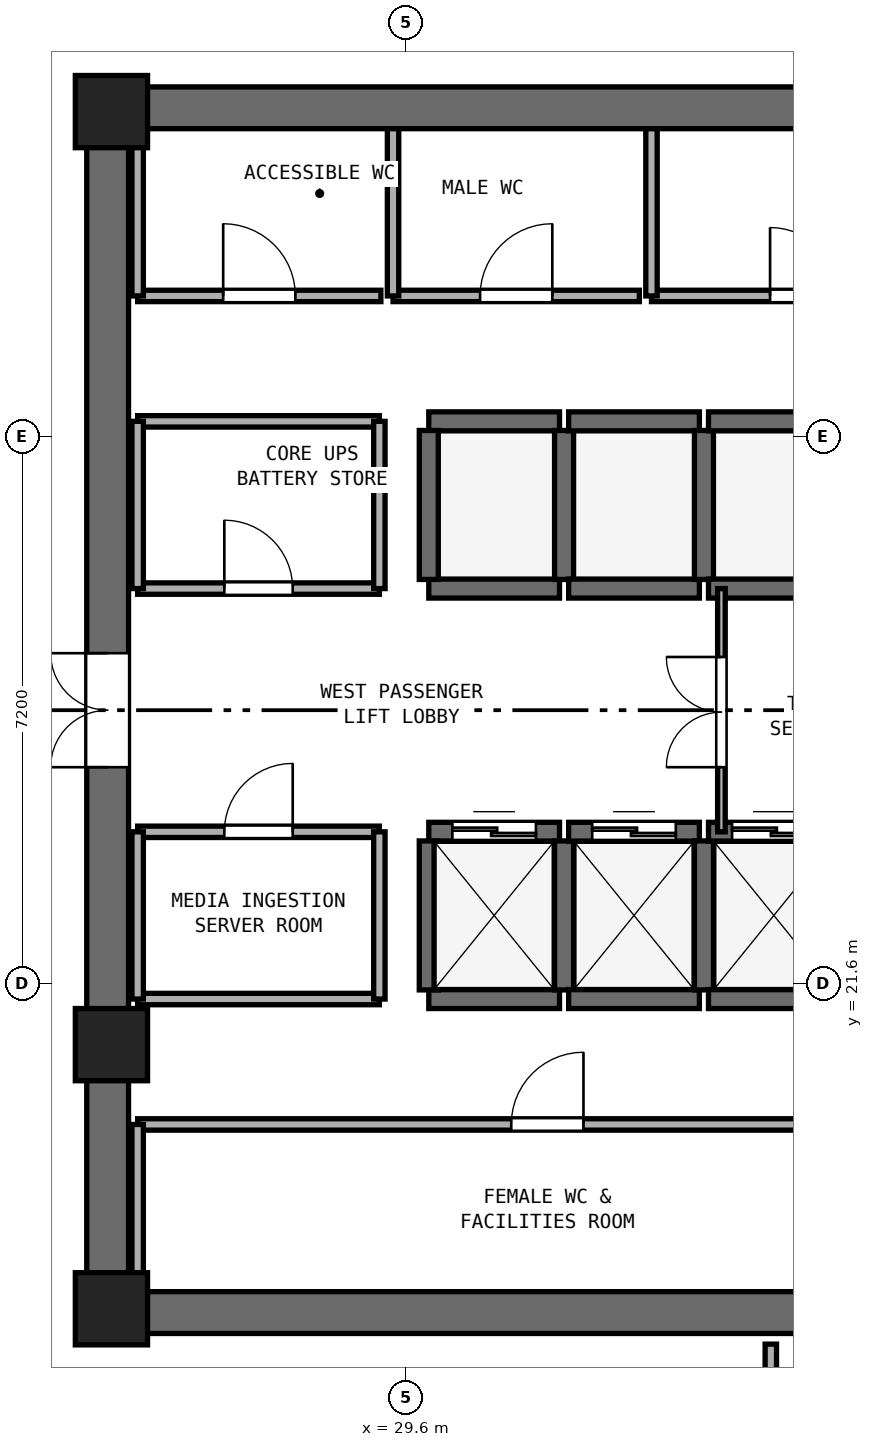
"""IFC4 building model, lengths in metres.
Left out: names, types, materials, properties, quantities, classifications, styles, units other than length and angle.
Written with IfcOpenShell. Run it as: python <this file> out.ifc"""

import sys

from ifc_helpers import new_model, si_unit, direction, frame, frame_2d, origin, origin_2d, place, context, subcontext, project, spatial, rectangle, extrude, element, fill, save


model = new_model("IFC4")
c1 = context("Model", 3, precision=1e-05, world=origin(), true_north=direction((0.0, 1.0)))
c2 = subcontext(c1, "Body", "Model", "MODEL_VIEW")
j1 = project(units=[si_unit("LENGTHUNIT", "METRE"), si_unit("PLANEANGLEUNIT", "RADIAN")], contexts=[c1])
p1 = place(None, origin())
s1 = spatial("IfcSite", under=j1, at=p1, CompositionType="ELEMENT")
p2 = place(p1, origin())
s2 = spatial("IfcBuilding", under=s1, at=p2, CompositionType="ELEMENT")
p3 = place(p2, frame((0.0, 0.0, 185.8)))
s3 = spatial("IfcBuildingStorey", under=s2, at=p3, CompositionType="ELEMENT", Elevation=185.8)
for number, where, z_axis, x_axis in (
    (1, (25.4, 17.275, 0.0), (0.0, 0.0, 1.0), (1.0, 0.0, 0.0)),
    (2, (25.4, 33.125, 0.0), (0.0, 0.0, 1.0), (1.0, 0.0, 0.0)),
):
    element("IfcWall", number, at=place(p3, frame(where, z_axis=z_axis, x_axis=x_axis)), inside=s3, PredefinedType="SHEAR", context=c2, shape_type="SweptSolid", body=[
        extrude(rectangle(XDim=23.2, YDim=0.55, at=frame_2d((11.6, 0.0))), origin(), (0.0, 0.0, 1.0), 3.54),
    ])
p4 = place(p3, frame((25.675, 17.55, 0.0), z_axis=(0.0, 0.0, 1.0), x_axis=(0.0, 1.0, 0.0)))
e3 = element("IfcWall", 3, at=p4, inside=s3, PredefinedType="SHEAR", context=c2, shape_type="SweptSolid", body=[
    extrude(rectangle(XDim=15.3, YDim=0.55, at=frame_2d((7.65, 0.0))), origin(), (0.0, 0.0, 1.0), 3.54),
])
p5 = place(p4, frame((6.9, 0.0, 0.0)))
e4 = element("IfcOpeningElement", 4, at=p5, cuts=e3, PredefinedType="OPENING", context=c2, shape_type="SweptSolid", body=[
    extrude(rectangle(XDim=1.5, YDim=2.15, at=frame_2d((0.75, 1.075))), frame((0.0, 0.285, 0.0), z_axis=(0.0, -1.0, 0.0), x_axis=(1.0, 0.0, 0.0)), (0.0, 0.0, 1.0), 0.57),
])
for number, where, z_axis, x_axis in (
    (5, (25.725, 17.325, 0.0), (0.0, 0.0, 1.0), (1.0, 0.0, 0.0)),
    (6, (25.725, 33.075, 0.0), (0.0, 0.0, 1.0), (1.0, 0.0, 0.0)),
    (7, (25.725, 20.8, 0.0), (0.0, 0.0, 1.0), (1.0, 0.0, 0.0)),
):
    element("IfcColumn", number, at=place(p3, frame(where, z_axis=z_axis, x_axis=x_axis)), inside=s3, PredefinedType="PILASTER", context=c2, shape_type="SweptSolid", body=[
        extrude(rectangle(XDim=0.95, YDim=0.95, at=origin_2d()), origin(), (0.0, 0.0, 1.0), 3.8),
    ])
p6 = place(p3, frame((29.9, 21.4, 0.0), z_axis=(0.0, 0.0, 1.0), x_axis=(1.0, 0.0, 0.0)))
e8 = element("IfcWall", 8, at=p6, inside=s3, PredefinedType="SHEAR", context=c2, shape_type="SweptSolid", body=[
    extrude(rectangle(XDim=1.72, YDim=0.25, at=frame_2d((0.86, 0.0))), origin(), (0.0, 0.0, 1.0), 3.54),
])
p7 = place(p3, frame((29.9, 23.6, 0.0), z_axis=(0.0, 0.0, 1.0), x_axis=(1.0, 0.0, 0.0)))
e9 = element("IfcWall", 9, at=p7, inside=s3, PredefinedType="SHEAR", context=c2, shape_type="SweptSolid", body=[
    extrude(rectangle(XDim=1.72, YDim=0.25, at=frame_2d((0.86, 0.0))), origin(), (0.0, 0.0, 1.0), 3.54),
])
p8 = place(p7, frame((0.31, 0.0, 0.0)))
e10 = element("IfcOpeningElement", 10, at=p8, cuts=e9, PredefinedType="OPENING", context=c2, shape_type="SweptSolid", body=[
    extrude(rectangle(XDim=1.1, YDim=2.15, at=frame_2d((0.55, 1.075))), frame((0.0, 0.135, 0.0), z_axis=(0.0, -1.0, 0.0), x_axis=(1.0, 0.0, 0.0)), (0.0, 0.0, 1.0), 0.27),
])
for number, where, z_axis, x_axis in (
    (11, (29.9, 21.52, 0.0), (0.0, 0.0, 1.0), (0.0, 1.0, 0.0)),
    (12, (31.68, 21.52, 0.0), (0.0, 0.0, 1.0), (0.0, 1.0, 0.0)),
):
    element("IfcWall", number, at=place(p3, frame(where, z_axis=z_axis, x_axis=x_axis)), inside=s3, PredefinedType="SHEAR", context=c2, shape_type="SweptSolid", body=[
        extrude(rectangle(XDim=1.96, YDim=0.25, at=frame_2d((0.98, 0.0))), origin(), (0.0, 0.0, 1.0), 3.54),
    ])
p9 = place(p3, frame((31.74, 21.4, 0.0), z_axis=(0.0, 0.0, 1.0), x_axis=(1.0, 0.0, 0.0)))
e13 = element("IfcWall", 13, at=p9, inside=s3, PredefinedType="SHEAR", context=c2, shape_type="SweptSolid", body=[
    extrude(rectangle(XDim=1.72, YDim=0.25, at=frame_2d((0.86, 0.0))), origin(), (0.0, 0.0, 1.0), 3.54),
])
p10 = place(p3, frame((31.74, 23.6, 0.0), z_axis=(0.0, 0.0, 1.0), x_axis=(1.0, 0.0, 0.0)))
e14 = element("IfcWall", 14, at=p10, inside=s3, PredefinedType="SHEAR", context=c2, shape_type="SweptSolid", body=[
    extrude(rectangle(XDim=1.72, YDim=0.25, at=frame_2d((0.86, 0.0))), origin(), (0.0, 0.0, 1.0), 3.54),
])
p11 = place(p10, frame((0.31, 0.0, 0.0)))
e15 = element("IfcOpeningElement", 15, at=p11, cuts=e14, PredefinedType="OPENING", context=c2, shape_type="SweptSolid", body=[
    extrude(rectangle(XDim=1.1, YDim=2.15, at=frame_2d((0.55, 1.075))), frame((0.0, 0.135, 0.0), z_axis=(0.0, -1.0, 0.0), x_axis=(1.0, 0.0, 0.0)), (0.0, 0.0, 1.0), 0.27),
])
p12 = place(p3, frame((33.52, 21.52, 0.0), z_axis=(0.0, 0.0, 1.0), x_axis=(0.0, 1.0, 0.0)))
e16 = element("IfcWall", 16, at=p12, inside=s3, PredefinedType="SHEAR", context=c2, shape_type="SweptSolid", body=[
    extrude(rectangle(XDim=1.96, YDim=0.25, at=frame_2d((0.98, 0.0))), origin(), (0.0, 0.0, 1.0), 3.54),
])
p13 = place(p3, frame((33.58, 21.4, 0.0), z_axis=(0.0, 0.0, 1.0), x_axis=(1.0, 0.0, 0.0)))
e17 = element("IfcWall", 17, at=p13, inside=s3, PredefinedType="SHEAR", context=c2, shape_type="SweptSolid", body=[
    extrude(rectangle(XDim=1.72, YDim=0.25, at=frame_2d((0.86, 0.0))), origin(), (0.0, 0.0, 1.0), 3.54),
])
p14 = place(p3, frame((33.58, 23.6, 0.0), z_axis=(0.0, 0.0, 1.0), x_axis=(1.0, 0.0, 0.0)))
e18 = element("IfcWall", 18, at=p14, inside=s3, PredefinedType="SHEAR", context=c2, shape_type="SweptSolid", body=[
    extrude(rectangle(XDim=1.72, YDim=0.25, at=frame_2d((0.86, 0.0))), origin(), (0.0, 0.0, 1.0), 3.54),
])
p15 = place(p14, frame((0.31, 0.0, 0.0)))
e19 = element("IfcOpeningElement", 19, at=p15, cuts=e18, PredefinedType="OPENING", context=c2, shape_type="SweptSolid", body=[
    extrude(rectangle(XDim=1.1, YDim=2.15, at=frame_2d((0.55, 1.075))), frame((0.0, 0.135, 0.0), z_axis=(0.0, -1.0, 0.0), x_axis=(1.0, 0.0, 0.0)), (0.0, 0.0, 1.0), 0.27),
])
for number, where, z_axis, x_axis in (
    (20, (29.9, 26.8, 0.0), (0.0, 0.0, 1.0), (1.0, 0.0, 0.0)),
    (21, (29.9, 29.0, 0.0), (0.0, 0.0, 1.0), (1.0, 0.0, 0.0)),
):
    element("IfcWall", number, at=place(p3, frame(where, z_axis=z_axis, x_axis=x_axis)), inside=s3, PredefinedType="SHEAR", context=c2, shape_type="SweptSolid", body=[
        extrude(rectangle(XDim=1.72, YDim=0.25, at=frame_2d((0.86, 0.0))), origin(), (0.0, 0.0, 1.0), 3.54),
    ])
for number, where, z_axis, x_axis in (
    (22, (29.9, 26.92, 0.0), (0.0, 0.0, 1.0), (0.0, 1.0, 0.0)),
    (23, (31.68, 26.92, 0.0), (0.0, 0.0, 1.0), (0.0, 1.0, 0.0)),
):
    element("IfcWall", number, at=place(p3, frame(where, z_axis=z_axis, x_axis=x_axis)), inside=s3, PredefinedType="SHEAR", context=c2, shape_type="SweptSolid", body=[
        extrude(rectangle(XDim=1.96, YDim=0.25, at=frame_2d((0.98, 0.0))), origin(), (0.0, 0.0, 1.0), 3.54),
    ])
for number, where, z_axis, x_axis in (
    (24, (31.74, 26.8, 0.0), (0.0, 0.0, 1.0), (1.0, 0.0, 0.0)),
    (25, (31.74, 29.0, 0.0), (0.0, 0.0, 1.0), (1.0, 0.0, 0.0)),
):
    element("IfcWall", number, at=place(p3, frame(where, z_axis=z_axis, x_axis=x_axis)), inside=s3, PredefinedType="SHEAR", context=c2, shape_type="SweptSolid", body=[
        extrude(rectangle(XDim=1.72, YDim=0.25, at=frame_2d((0.86, 0.0))), origin(), (0.0, 0.0, 1.0), 3.54),
    ])
p16 = place(p3, frame((33.52, 26.92, 0.0), z_axis=(0.0, 0.0, 1.0), x_axis=(0.0, 1.0, 0.0)))
e26 = element("IfcWall", 26, at=p16, inside=s3, PredefinedType="SHEAR", context=c2, shape_type="SweptSolid", body=[
    extrude(rectangle(XDim=1.96, YDim=0.25, at=frame_2d((0.98, 0.0))), origin(), (0.0, 0.0, 1.0), 3.54),
])
for number, where, z_axis, x_axis in (
    (27, (33.58, 26.8, 0.0), (0.0, 0.0, 1.0), (1.0, 0.0, 0.0)),
    (28, (33.58, 29.0, 0.0), (0.0, 0.0, 1.0), (1.0, 0.0, 0.0)),
):
    element("IfcWall", number, at=place(p3, frame(where, z_axis=z_axis, x_axis=x_axis)), inside=s3, PredefinedType="SHEAR", context=c2, shape_type="SweptSolid", body=[
        extrude(rectangle(XDim=1.72, YDim=0.25, at=frame_2d((0.86, 0.0))), origin(), (0.0, 0.0, 1.0), 3.54),
    ])
p17 = place(p3, frame((26.07, 30.65, 0.0), z_axis=(0.0, 0.0, 1.0), x_axis=(1.0, 0.0, 0.0)))
e29 = element("IfcWall", 29, at=p17, inside=s3, PredefinedType="PARTITIONING", context=c2, shape_type="SweptSolid", body=[
    extrude(rectangle(XDim=3.2, YDim=0.15, at=frame_2d((1.6, 0.0))), origin(), (0.0, 0.0, 1.0), 3.54),
])
p18 = place(p17, frame((1.125, 0.0, 0.0)))
e30 = element("IfcOpeningElement", 30, at=p18, cuts=e29, PredefinedType="OPENING", context=c2, shape_type="SweptSolid", body=[
    extrude(rectangle(XDim=0.95, YDim=2.1, at=frame_2d((0.475, 1.05))), frame((0.0, 0.085, 0.0), z_axis=(0.0, -1.0, 0.0), x_axis=(1.0, 0.0, 0.0)), (0.0, 0.0, 1.0), 0.17),
])
p19 = place(p3, frame((26.07, 30.65, 0.0), z_axis=(0.0, 0.0, 1.0), x_axis=(0.0, 1.0, 0.0)))
e31 = element("IfcWall", 31, at=p19, inside=s3, PredefinedType="PARTITIONING", context=c2, shape_type="SweptSolid", body=[
    extrude(rectangle(XDim=2.2, YDim=0.15, at=frame_2d((1.1, 0.0))), origin(), (0.0, 0.0, 1.0), 2.64),
])
p20 = place(p3, frame((29.43, 30.65, 0.0), z_axis=(0.0, 0.0, 1.0), x_axis=(1.0, 0.0, 0.0)))
e32 = element("IfcWall", 32, at=p20, inside=s3, PredefinedType="PARTITIONING", context=c2, shape_type="SweptSolid", body=[
    extrude(rectangle(XDim=3.24, YDim=0.15, at=frame_2d((1.62, 0.0))), origin(), (0.0, 0.0, 1.0), 3.54),
])
p21 = place(p20, frame((1.145, 0.0, 0.0)))
e33 = element("IfcOpeningElement", 33, at=p21, cuts=e32, PredefinedType="OPENING", context=c2, shape_type="SweptSolid", body=[
    extrude(rectangle(XDim=0.95, YDim=2.1, at=frame_2d((0.475, 1.05))), frame((0.0, 0.085, 0.0), z_axis=(0.0, -1.0, 0.0), x_axis=(1.0, 0.0, 0.0)), (0.0, 0.0, 1.0), 0.17),
])
p22 = place(p3, frame((29.43, 30.65, 0.0), z_axis=(0.0, 0.0, 1.0), x_axis=(0.0, 1.0, 0.0)))
e34 = element("IfcWall", 34, at=p22, inside=s3, PredefinedType="PARTITIONING", context=c2, shape_type="SweptSolid", body=[
    extrude(rectangle(XDim=2.2, YDim=0.15, at=frame_2d((1.1, 0.0))), origin(), (0.0, 0.0, 1.0), 3.54),
])
p23 = place(p3, frame((32.83, 30.65, 0.0), z_axis=(0.0, 0.0, 1.0), x_axis=(1.0, 0.0, 0.0)))
e35 = element("IfcWall", 35, at=p23, inside=s3, PredefinedType="PARTITIONING", context=c2, shape_type="SweptSolid", body=[
    extrude(rectangle(XDim=4.02, YDim=0.15, at=frame_2d((2.01, 0.0))), origin(), (0.0, 0.0, 1.0), 3.54),
])
p24 = place(p23, frame((1.56, 0.0, 0.0)))
e36 = element("IfcOpeningElement", 36, at=p24, cuts=e35, PredefinedType="OPENING", context=c2, shape_type="SweptSolid", body=[
    extrude(rectangle(XDim=0.9, YDim=2.1, at=frame_2d((0.45, 1.05))), frame((0.0, 0.085, 0.0), z_axis=(0.0, -1.0, 0.0), x_axis=(1.0, 0.0, 0.0)), (0.0, 0.0, 1.0), 0.17),
])
p25 = place(p3, frame((32.83, 30.65, 0.0), z_axis=(0.0, 0.0, 1.0), x_axis=(0.0, 1.0, 0.0)))
e37 = element("IfcWall", 37, at=p25, inside=s3, PredefinedType="PARTITIONING", context=c2, shape_type="SweptSolid", body=[
    extrude(rectangle(XDim=2.2, YDim=0.15, at=frame_2d((1.1, 0.0))), origin(), (0.0, 0.0, 1.0), 3.54),
])
p26 = place(p3, frame((26.07, 19.75, 0.0), z_axis=(0.0, 0.0, 1.0), x_axis=(1.0, 0.0, 0.0)))
e38 = element("IfcWall", 38, at=p26, inside=s3, PredefinedType="PARTITIONING", context=c2, shape_type="SweptSolid", body=[
    extrude(rectangle(XDim=10.78, YDim=0.15, at=frame_2d((5.39, 0.0))), origin(), (0.0, 0.0, 1.0), 3.54),
])
p27 = place(p26, frame((4.915, 0.0, 0.0)))
e39 = element("IfcOpeningElement", 39, at=p27, cuts=e38, PredefinedType="OPENING", context=c2, shape_type="SweptSolid", body=[
    extrude(rectangle(XDim=0.95, YDim=2.1, at=frame_2d((0.475, 1.05))), frame((0.0, 0.085, 0.0), z_axis=(0.0, -1.0, 0.0), x_axis=(1.0, 0.0, 0.0)), (0.0, 0.0, 1.0), 0.17),
])
p28 = place(p3, frame((26.07, 17.55, 0.0), z_axis=(0.0, 0.0, 1.0), x_axis=(0.0, 1.0, 0.0)))
e40 = element("IfcWall", 40, at=p28, inside=s3, PredefinedType="PARTITIONING", context=c2, shape_type="SweptSolid", body=[
    extrude(rectangle(XDim=2.2, YDim=0.15, at=frame_2d((1.1, 0.0))), origin(), (0.0, 0.0, 1.0), 2.64),
])
p29 = place(p3, frame((26.07, 26.8, 0.0), z_axis=(0.0, 0.0, 1.0), x_axis=(1.0, 0.0, 0.0)))
e41 = element("IfcWall", 41, at=p29, inside=s3, PredefinedType="PARTITIONING", context=c2, shape_type="SweptSolid", body=[
    extrude(rectangle(XDim=3.18, YDim=0.15, at=frame_2d((1.59, 0.0))), origin(), (0.0, 0.0, 1.0), 3.54),
])
p30 = place(p29, frame((1.14, 0.0, 0.0)))
e42 = element("IfcOpeningElement", 42, at=p30, cuts=e41, PredefinedType="OPENING", context=c2, shape_type="SweptSolid", body=[
    extrude(rectangle(XDim=0.9, YDim=2.1, at=frame_2d((0.45, 1.05))), frame((0.0, 0.085, 0.0), z_axis=(0.0, -1.0, 0.0), x_axis=(1.0, 0.0, 0.0)), (0.0, 0.0, 1.0), 0.17),
])
p31 = place(p3, frame((26.07, 29.0, 0.0), z_axis=(0.0, 0.0, 1.0), x_axis=(1.0, 0.0, 0.0)))
e43 = element("IfcWall", 43, at=p31, inside=s3, PredefinedType="PARTITIONING", context=c2, shape_type="SweptSolid", body=[
    extrude(rectangle(XDim=3.18, YDim=0.15, at=frame_2d((1.59, 0.0))), origin(), (0.0, 0.0, 1.0), 3.54),
])
p32 = place(p3, frame((26.07, 26.8, 0.0), z_axis=(0.0, 0.0, 1.0), x_axis=(0.0, 1.0, 0.0)))
e44 = element("IfcWall", 44, at=p32, inside=s3, PredefinedType="PARTITIONING", context=c2, shape_type="SweptSolid", body=[
    extrude(rectangle(XDim=2.2, YDim=0.15, at=frame_2d((1.1, 0.0))), origin(), (0.0, 0.0, 1.0), 2.64),
])
p33 = place(p3, frame((29.25, 26.8, 0.0), z_axis=(0.0, 0.0, 1.0), x_axis=(0.0, 1.0, 0.0)))
e45 = element("IfcWall", 45, at=p33, inside=s3, PredefinedType="PARTITIONING", context=c2, shape_type="SweptSolid", body=[
    extrude(rectangle(XDim=2.2, YDim=0.15, at=frame_2d((1.1, 0.0))), origin(), (0.0, 0.0, 1.0), 3.54),
])
p34 = place(p3, frame((26.07, 21.4, 0.0), z_axis=(0.0, 0.0, 1.0), x_axis=(1.0, 0.0, 0.0)))
e46 = element("IfcWall", 46, at=p34, inside=s3, PredefinedType="PARTITIONING", context=c2, shape_type="SweptSolid", body=[
    extrude(rectangle(XDim=3.18, YDim=0.15, at=frame_2d((1.59, 0.0))), origin(), (0.0, 0.0, 1.0), 3.54),
])
p35 = place(p3, frame((26.07, 23.6, 0.0), z_axis=(0.0, 0.0, 1.0), x_axis=(1.0, 0.0, 0.0)))
e47 = element("IfcWall", 47, at=p35, inside=s3, PredefinedType="PARTITIONING", context=c2, shape_type="SweptSolid", body=[
    extrude(rectangle(XDim=3.18, YDim=0.15, at=frame_2d((1.59, 0.0))), origin(), (0.0, 0.0, 1.0), 3.54),
])
p36 = place(p35, frame((1.14, 0.0, 0.0)))
e48 = element("IfcOpeningElement", 48, at=p36, cuts=e47, PredefinedType="OPENING", context=c2, shape_type="SweptSolid", body=[
    extrude(rectangle(XDim=0.9, YDim=2.1, at=frame_2d((0.45, 1.05))), frame((0.0, 0.085, 0.0), z_axis=(0.0, -1.0, 0.0), x_axis=(1.0, 0.0, 0.0)), (0.0, 0.0, 1.0), 0.17),
])
p37 = place(p3, frame((26.07, 21.4, 0.0), z_axis=(0.0, 0.0, 1.0), x_axis=(0.0, 1.0, 0.0)))
e49 = element("IfcWall", 49, at=p37, inside=s3, PredefinedType="PARTITIONING", context=c2, shape_type="SweptSolid", body=[
    extrude(rectangle(XDim=2.2, YDim=0.15, at=frame_2d((1.1, 0.0))), origin(), (0.0, 0.0, 1.0), 2.64),
])
p38 = place(p3, frame((29.25, 21.4, 0.0), z_axis=(0.0, 0.0, 1.0), x_axis=(0.0, 1.0, 0.0)))
e50 = element("IfcWall", 50, at=p38, inside=s3, PredefinedType="PARTITIONING", context=c2, shape_type="SweptSolid", body=[
    extrude(rectangle(XDim=2.2, YDim=0.15, at=frame_2d((1.1, 0.0))), origin(), (0.0, 0.0, 1.0), 3.54),
])
p39 = place(p3, frame((33.75, 23.6, 0.0), z_axis=(0.0, 0.0, 1.0), x_axis=(0.0, 1.0, 0.0)))
e51 = element("IfcWall", 51, at=p39, inside=s3, PredefinedType="PARTITIONING", context=c2, shape_type="SweptSolid", body=[
    extrude(rectangle(XDim=3.2, YDim=0.1, at=frame_2d((1.6, 0.0))), origin(), (0.0, 0.0, 1.0), 3.54),
])
p40 = place(p39, frame((0.85, 0.0, 0.0)))
e52 = element("IfcOpeningElement", 52, at=p40, cuts=e51, PredefinedType="OPENING", context=c2, shape_type="SweptSolid", body=[
    extrude(rectangle(XDim=1.45, YDim=2.12, at=frame_2d((0.725, 1.06))), frame((0.0, 0.06, 0.0), z_axis=(0.0, -1.0, 0.0), x_axis=(1.0, 0.0, 0.0)), (0.0, 0.0, 1.0), 0.12),
])
p41 = place(p3, frame((34.4, 14.85, 0.0), z_axis=(0.0, 0.0, 1.0), x_axis=(0.0, 1.0, 0.0)))
e53 = element("IfcWall", 53, at=p41, inside=s3, PredefinedType="PARTITIONING", context=c2, shape_type="SweptSolid", body=[
    extrude(rectangle(XDim=2.01, YDim=0.15, at=frame_2d((1.005, 0.0))), origin(), (0.0, 0.0, 1.0), 3.54),
])
p42 = place(p8, origin())
e54 = element("IfcDoor", 54, at=p42, inside=s3, OperationType="DOUBLE_DOOR_SLIDING", PredefinedType="DOOR", context=c2, shape_type="SweptSolid", body=[
    extrude(rectangle(XDim=1.1, YDim=2.15, at=frame_2d((0.55, 1.075))), frame((0.0, 0.025, 0.0), z_axis=(0.0, -1.0, 0.0), x_axis=(1.0, 0.0, 0.0)), (0.0, 0.0, 1.0), 0.05),
])
fill(e10, e54)
p43 = place(p11, origin())
e55 = element("IfcDoor", 55, at=p43, inside=s3, OperationType="DOUBLE_DOOR_SLIDING", PredefinedType="DOOR", context=c2, shape_type="SweptSolid", body=[
    extrude(rectangle(XDim=1.1, YDim=2.15, at=frame_2d((0.55, 1.075))), frame((0.0, 0.025, 0.0), z_axis=(0.0, -1.0, 0.0), x_axis=(1.0, 0.0, 0.0)), (0.0, 0.0, 1.0), 0.05),
])
fill(e15, e55)
p44 = place(p15, origin())
e56 = element("IfcDoor", 56, at=p44, inside=s3, OperationType="DOUBLE_DOOR_SLIDING", PredefinedType="DOOR", context=c2, shape_type="SweptSolid", body=[
    extrude(rectangle(XDim=1.1, YDim=2.15, at=frame_2d((0.55, 1.075))), frame((0.0, 0.025, 0.0), z_axis=(0.0, -1.0, 0.0), x_axis=(1.0, 0.0, 0.0)), (0.0, 0.0, 1.0), 0.05),
])
fill(e19, e56)
p45 = place(p5, origin())
e57 = element("IfcDoor", 57, at=p45, inside=s3, OperationType="DOUBLE_DOOR_SINGLE_SWING", PredefinedType="DOOR", context=c2, shape_type="SweptSolid", body=[
    extrude(rectangle(XDim=1.5, YDim=2.15, at=frame_2d((0.75, 1.075))), frame((0.0, 0.025, 0.0), z_axis=(0.0, -1.0, 0.0), x_axis=(1.0, 0.0, 0.0)), (0.0, 0.0, 1.0), 0.05),
])
fill(e4, e57)
p46 = place(p18, origin())
e58 = element("IfcDoor", 58, at=p46, inside=s3, OperationType="SINGLE_SWING_LEFT", PredefinedType="DOOR", context=c2, shape_type="SweptSolid", body=[
    extrude(rectangle(XDim=0.95, YDim=2.1, at=frame_2d((0.475, 1.05))), frame((0.0, 0.025, 0.0), z_axis=(0.0, -1.0, 0.0), x_axis=(1.0, 0.0, 0.0)), (0.0, 0.0, 1.0), 0.05),
])
fill(e30, e58)
p47 = place(p21, origin())
e59 = element("IfcDoor", 59, at=p47, inside=s3, OperationType="SINGLE_SWING_RIGHT", PredefinedType="DOOR", context=c2, shape_type="SweptSolid", body=[
    extrude(rectangle(XDim=0.95, YDim=2.1, at=frame_2d((0.475, 1.05))), frame((0.0, 0.025, 0.0), z_axis=(0.0, -1.0, 0.0), x_axis=(1.0, 0.0, 0.0)), (0.0, 0.0, 1.0), 0.05),
])
fill(e33, e59)
p48 = place(p24, origin())
e60 = element("IfcDoor", 60, at=p48, inside=s3, OperationType="SINGLE_SWING_LEFT", PredefinedType="DOOR", context=c2, shape_type="SweptSolid", body=[
    extrude(rectangle(XDim=0.9, YDim=2.1, at=frame_2d((0.45, 1.05))), frame((0.0, 0.025, 0.0), z_axis=(0.0, -1.0, 0.0), x_axis=(1.0, 0.0, 0.0)), (0.0, 0.0, 1.0), 0.05),
])
fill(e36, e60)
p49 = place(p27, origin())
e61 = element("IfcDoor", 61, at=p49, inside=s3, OperationType="SINGLE_SWING_RIGHT", PredefinedType="DOOR", context=c2, shape_type="SweptSolid", body=[
    extrude(rectangle(XDim=0.95, YDim=2.1, at=frame_2d((0.475, 1.05))), frame((0.0, 0.025, 0.0), z_axis=(0.0, -1.0, 0.0), x_axis=(1.0, 0.0, 0.0)), (0.0, 0.0, 1.0), 0.05),
])
fill(e39, e61)
p50 = place(p30, origin())
e62 = element("IfcDoor", 62, at=p50, inside=s3, OperationType="SINGLE_SWING_LEFT", PredefinedType="DOOR", context=c2, shape_type="SweptSolid", body=[
    extrude(rectangle(XDim=0.9, YDim=2.1, at=frame_2d((0.45, 1.05))), frame((0.0, 0.025, 0.0), z_axis=(0.0, -1.0, 0.0), x_axis=(1.0, 0.0, 0.0)), (0.0, 0.0, 1.0), 0.05),
])
fill(e42, e62)
p51 = place(p36, origin())
e63 = element("IfcDoor", 63, at=p51, inside=s3, OperationType="SINGLE_SWING_RIGHT", PredefinedType="DOOR", context=c2, shape_type="SweptSolid", body=[
    extrude(rectangle(XDim=0.9, YDim=2.1, at=frame_2d((0.45, 1.05))), frame((0.0, 0.025, 0.0), z_axis=(0.0, -1.0, 0.0), x_axis=(1.0, 0.0, 0.0)), (0.0, 0.0, 1.0), 0.05),
])
fill(e48, e63)
p52 = place(p40, origin())
e64 = element("IfcDoor", 64, at=p52, inside=s3, OperationType="DOUBLE_DOOR_SINGLE_SWING", PredefinedType="DOOR", context=c2, shape_type="SweptSolid", body=[
    extrude(rectangle(XDim=1.45, YDim=2.12, at=frame_2d((0.725, 1.06))), frame((0.0, 0.025, 0.0), z_axis=(0.0, -1.0, 0.0), x_axis=(1.0, 0.0, 0.0)), (0.0, 0.0, 1.0), 0.05),
])
fill(e52, e64)
save(model, sys.argv[1])
